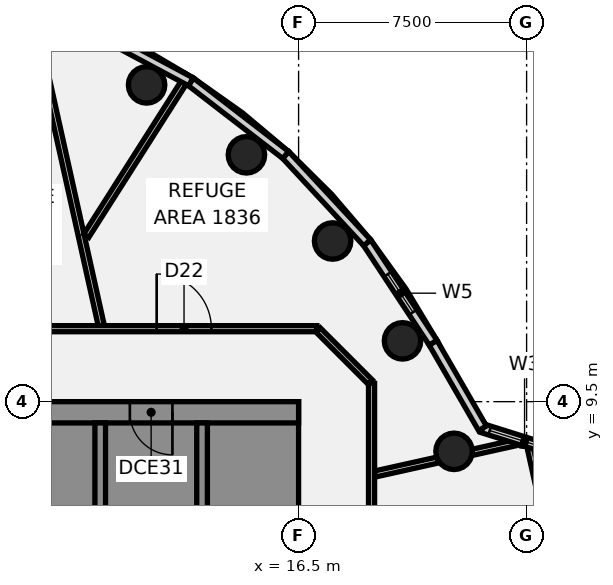
"""IFC4 building model, lengths in metres.
Left out: names, types, materials, properties, quantities, classifications, styles, units other than length and angle.
Written with IfcOpenShell. Run it as: python <this file> out.ifc"""

import sys

from ifc_helpers import new_model, si_unit, direction, frame, frame_2d, origin, origin_2d, place, context, subcontext, project, spatial, polyline, rectangle, circle, outline, extrude, element, fill, save


model = new_model("IFC4")
c1 = context("Model", 3, precision=1e-05, world=origin(), true_north=direction((0.0, 1.0)))
c2 = subcontext(c1, "Body", "Model", "MODEL_VIEW")
j1 = project(units=[si_unit("LENGTHUNIT", "METRE"), si_unit("PLANEANGLEUNIT", "RADIAN")], contexts=[c1])
p1 = place(None, origin())
s1 = spatial("IfcSite", under=j1, at=p1, CompositionType="ELEMENT")
p2 = place(p1, origin())
s2 = spatial("IfcBuilding", under=s1, at=p2, CompositionType="ELEMENT")
p3 = place(p2, frame((0.0, 0.0, 79.0)))
s3 = spatial("IfcBuildingStorey", under=s2, at=p3, CompositionType="ELEMENT", Elevation=79.0)
for number, where, z_axis, x_axis in (
    (1, (21.613, 7.866, -0.18), (0.0, 0.0, 1.0), (1.0, 0.0, 0.0)),
    (2, (19.919, 11.5, -0.18), (0.0, 0.0, 1.0), (1.0, 0.0, 0.0)),
    (3, (17.619, 14.784, -0.18), (0.0, 0.0, 1.0), (1.0, 0.0, 0.0)),
    (4, (14.784, 17.619, -0.18), (0.0, 0.0, 1.0), (1.0, 0.0, 0.0)),
    (5, (11.5, 19.919, -0.18), (0.0, 0.0, 1.0), (1.0, 0.0, 0.0)),
):
    element("IfcColumn", number, at=place(p3, frame(where, z_axis=z_axis, x_axis=x_axis)), inside=s3, PredefinedType="COLUMN", context=c2, shape_type="SweptSolid", body=[
        extrude(circle(Radius=0.6, at=origin_2d()), origin(), (0.0, 0.0, 1.0), 4.54),
    ])
p4 = place(p3, frame((7.999, 21.039, 0.0), z_axis=(0.0, 0.0, 1.0), x_axis=(0.217134305932, -0.976141738267, 0.0)))
e6 = element("IfcWall", 6, at=p4, inside=s3, PredefinedType="PARTITIONING", context=c2, shape_type="SweptSolid", body=[
    extrude(rectangle(XDim=9.257, YDim=0.2, at=frame_2d((4.628, 0.0))), origin(), (0.0, 0.0, 1.0), 3.66),
])
p5 = place(p3, frame((24.12, 7.973, 0.0), z_axis=(0.0, 0.0, 1.0), x_axis=(0.216928614258, -0.976187469862, 0.0)))
e7 = element("IfcWall", 7, at=p5, inside=s3, PredefinedType="PARTITIONING", context=c2, shape_type="SweptSolid", body=[
    extrude(rectangle(XDim=14.022, YDim=0.2, at=frame_2d((7.011, 0.0))), origin(), (0.0, 0.0, 1.0), 3.66),
])
p6 = place(p5, frame((6.723, 0.0, 0.0)))
e8 = element("IfcOpeningElement", 8, at=p6, cuts=e7, PredefinedType="OPENING", context=c2, shape_type="SweptSolid", body=[
    extrude(rectangle(XDim=1.4, YDim=2.1, at=frame_2d((0.7, 1.05))), frame((0.0, 0.11, 0.0), z_axis=(0.0, -1.0, 0.0), x_axis=(1.0, 0.0, 0.0)), (0.0, 0.0, 1.0), 0.22),
])
p7 = place(p3, frame((17.142, 11.858, 0.0), z_axis=(0.0, 0.0, 1.0), x_axis=(0.707106781187, -0.707106781187, 0.0)))
e9 = element("IfcWall", 9, at=p7, inside=s3, PredefinedType="PARTITIONING", context=c2, shape_type="SweptSolid", body=[
    extrude(rectangle(XDim=2.426, YDim=0.2, at=frame_2d((1.213, 0.0))), origin(), (0.0, 0.0, 1.0), 3.66),
])
p8 = place(p3, frame((-17.045, 11.9, 0.0), z_axis=(0.0, 0.0, 1.0), x_axis=(1.0, 0.0, 0.0)))
e10 = element("IfcWall", 10, at=p8, inside=s3, PredefinedType="PARTITIONING", context=c2, shape_type="SweptSolid", body=[
    extrude(rectangle(XDim=34.145, YDim=0.2, at=frame_2d((17.073, 0.0))), origin(), (0.0, 0.0, 1.0), 3.66),
])
p9 = place(p8, frame((18.358, 0.0, 0.0)))
e11 = element("IfcOpeningElement", 11, at=p9, cuts=e10, PredefinedType="OPENING", context=c2, shape_type="SweptSolid", body=[
    extrude(rectangle(XDim=1.8, YDim=2.1, at=frame_2d((0.9, 1.05))), frame((0.0, 0.11, 0.0), z_axis=(0.0, -1.0, 0.0), x_axis=(1.0, 0.0, 0.0)), (0.0, 0.0, 1.0), 0.22),
])
p10 = place(p8, frame((28.877, 0.0, 0.0)))
e12 = element("IfcOpeningElement", 12, at=p10, cuts=e10, PredefinedType="OPENING", context=c2, shape_type="SweptSolid", body=[
    extrude(rectangle(XDim=1.8, YDim=2.1, at=frame_2d((0.9, 1.05))), frame((0.0, 0.11, 0.0), z_axis=(0.0, -1.0, 0.0), x_axis=(1.0, 0.0, 0.0)), (0.0, 0.0, 1.0), 0.22),
])
p11 = place(p8, frame((4.895, 0.0, 0.0)))
e13 = element("IfcOpeningElement", 13, at=p11, cuts=e10, PredefinedType="OPENING", context=c2, shape_type="SweptSolid", body=[
    extrude(rectangle(XDim=1.8, YDim=2.1, at=frame_2d((0.9, 1.05))), frame((0.0, 0.11, 0.0), z_axis=(0.0, -1.0, 0.0), x_axis=(1.0, 0.0, 0.0)), (0.0, 0.0, 1.0), 0.22),
])
p12 = place(p3, frame((19.002, 7.119, 0.0), z_axis=(0.0, 0.0, 1.0), x_axis=(0.97615465389, 0.217076234739, 0.0)))
e14 = element("IfcWall", 14, at=p12, inside=s3, PredefinedType="PARTITIONING", context=c2, shape_type="SweptSolid", body=[
    extrude(rectangle(XDim=2.128, YDim=0.2, at=frame_2d((1.064, 0.0))), origin(), (0.0, 0.0, 1.0), 3.66),
])
p13 = place(p3, frame((22.214, 7.833, 0.0), z_axis=(0.0, 0.0, 1.0), x_axis=(0.976142259417, 0.217131963057, 0.0)))
e15 = element("IfcWall", 15, at=p13, inside=s3, PredefinedType="PARTITIONING", context=c2, shape_type="SweptSolid", body=[
    extrude(rectangle(XDim=1.411, YDim=0.2, at=frame_2d((0.706, 0.0))), origin(), (0.0, 0.0, 1.0), 3.66),
])
p14 = place(p3, frame((9.513, 14.952, 0.0), z_axis=(0.0, 0.0, 1.0), x_axis=(0.536804820056, 0.843706456752, 0.0)))
e16 = element("IfcWall", 16, at=p14, inside=s3, PredefinedType="PARTITIONING", context=c2, shape_type="SweptSolid", body=[
    extrude(rectangle(XDim=6.259, YDim=0.2, at=frame_2d((3.129, 0.0))), origin(), (0.0, 0.0, 1.0), 3.66),
])
p15 = place(p3, frame((18.9, -10.1, 0.0), z_axis=(0.0, 0.0, 1.0), x_axis=(0.0, 1.0, 0.0)))
e17 = element("IfcWall", 17, at=p15, inside=s3, PredefinedType="PARTITIONING", context=c2, shape_type="SweptSolid", body=[
    extrude(rectangle(XDim=20.2, YDim=0.2, at=frame_2d((10.1, 0.0))), origin(), (0.0, 0.0, 1.0), 3.66),
])
p16 = place(p15, frame((9.228, 0.0, 0.0)))
e18 = element("IfcOpeningElement", 18, at=p16, cuts=e17, PredefinedType="OPENING", context=c2, shape_type="SweptSolid", body=[
    extrude(rectangle(XDim=1.8, YDim=2.1, at=frame_2d((0.9, 1.05))), frame((0.0, 0.11, 0.0), z_axis=(0.0, -1.0, 0.0), x_axis=(1.0, 0.0, 0.0)), (0.0, 0.0, 1.0), 0.22),
])
p17 = place(p15, frame((13.794, 0.0, 0.0)))
e19 = element("IfcOpeningElement", 19, at=p17, cuts=e17, PredefinedType="OPENING", context=c2, shape_type="SweptSolid", body=[
    extrude(rectangle(XDim=1.8, YDim=2.1, at=frame_2d((0.9, 1.05))), frame((0.0, 0.11, 0.0), z_axis=(0.0, -1.0, 0.0), x_axis=(1.0, 0.0, 0.0)), (0.0, 0.0, 1.0), 0.22),
])
p18 = place(p3, frame((25.268, 7.771, 0.0), z_axis=(0.0, 0.0, 1.0), x_axis=(-0.954072095572, 0.299577096006, 0.0)))
e20 = element("IfcWall", 20, at=p18, inside=s3, PredefinedType="SOLIDWALL", context=c2, shape_type="SweptSolid", body=[
    extrude(rectangle(XDim=2.85, YDim=0.3, at=frame_2d((1.425, 0.0))), origin(), (0.0, 0.0, 1.0), 4.36),
])
p19 = place(p18, frame((0.2, 0.0, 1.4)))
e21 = element("IfcOpeningElement", 21, at=p19, cuts=e20, PredefinedType="OPENING", context=c2, shape_type="SweptSolid", body=[
    extrude(rectangle(XDim=2.4, YDim=2.1, at=frame_2d((1.2, 1.05))), frame((0.0, 0.16, 0.0), z_axis=(0.0, -1.0, 0.0), x_axis=(1.0, 0.0, 0.0)), (0.0, 0.0, 1.0), 0.32),
])
p20 = place(p3, frame((22.549, 8.625, 0.0), z_axis=(0.0, 0.0, 1.0), x_axis=(-0.500322641095, 0.86583904671, 0.0)))
e22 = element("IfcWall", 22, at=p20, inside=s3, PredefinedType="SOLIDWALL", context=c2, shape_type="SweptSolid", body=[
    extrude(rectangle(XDim=3.251, YDim=0.3, at=frame_2d((1.625, 0.0))), origin(), (0.0, 0.0, 1.0), 4.36),
])
p21 = place(p3, frame((20.923, 11.439, 0.0), z_axis=(0.0, 0.0, 1.0), x_axis=(-0.550573607302, 0.834786621205, 0.0)))
e23 = element("IfcWall", 23, at=p21, inside=s3, PredefinedType="SOLIDWALL", context=c2, shape_type="SweptSolid", body=[
    extrude(rectangle(XDim=3.938, YDim=0.3, at=frame_2d((1.969, 0.0))), origin(), (0.0, 0.0, 1.0), 4.36),
])
p22 = place(p21, frame((1.2, 0.0, 1.4)))
e24 = element("IfcOpeningElement", 24, at=p22, cuts=e23, PredefinedType="OPENING", context=c2, shape_type="SweptSolid", body=[
    extrude(rectangle(XDim=1.5, YDim=1.0, at=frame_2d((0.75, 0.5))), frame((0.0, 0.16, 0.0), z_axis=(0.0, -1.0, 0.0), x_axis=(1.0, 0.0, 0.0)), (0.0, 0.0, 1.0), 0.32),
])
p23 = place(p3, frame((18.754, 14.727, 0.0), z_axis=(0.0, 0.0, 1.0), x_axis=(-0.680429698926, 0.732813362883, 0.0)))
e25 = element("IfcWall", 25, at=p23, inside=s3, PredefinedType="SOLIDWALL", context=c2, shape_type="SweptSolid", body=[
    extrude(rectangle(XDim=3.938, YDim=0.3, at=frame_2d((1.969, 0.0))), origin(), (0.0, 0.0, 1.0), 4.36),
])
p24 = place(p3, frame((16.075, 17.613, 0.0), z_axis=(0.0, 0.0, 1.0), x_axis=(-0.79179596038, 0.610785688376, 0.0)))
e26 = element("IfcWall", 26, at=p24, inside=s3, PredefinedType="SOLIDWALL", context=c2, shape_type="SweptSolid", body=[
    extrude(rectangle(XDim=3.938, YDim=0.3, at=frame_2d((1.969, 0.0))), origin(), (0.0, 0.0, 1.0), 4.36),
])
p25 = place(p3, frame((12.956, 20.019, 0.0), z_axis=(0.0, 0.0, 1.0), x_axis=(-0.881521417359, 0.472144036007, 0.0)))
e27 = element("IfcWall", 27, at=p25, inside=s3, PredefinedType="SOLIDWALL", context=c2, shape_type="SweptSolid", body=[
    extrude(rectangle(XDim=3.94, YDim=0.3, at=frame_2d((1.97, 0.0))), origin(), (0.0, 0.0, 1.0), 4.36),
])
p26 = place(p3, origin())
e28 = element("IfcWall", 28, at=p26, inside=s3, PredefinedType="SHEAR", context=c2, shape_type="SweptSolid", body=[
    extrude(outline(polyline([(13.5, -8.8), (15.8, -8.8), (16.5, -8.8), (16.5, 8.8), (15.8, 8.8), (13.5, 8.8), (13.5, 8.125), (15.8, 8.125), (15.8, 5.625), (13.5, 5.625), (13.5, 5.375), (15.8, 5.375), (15.8, 2.875), (13.5, 2.875), (13.5, 2.625), (15.8, 2.625), (15.8, 0.125), (13.5, 0.125), (13.5, -0.125), (15.8, -0.125), (15.8, -2.625), (13.5, -2.625), (13.5, -2.875), (15.8, -2.875), (15.8, -5.375), (13.5, -5.375), (13.5, -5.625), (15.8, -5.625), (15.8, -8.125), (13.5, -8.125), (13.5, -8.8)])), origin(), (0.0, 0.0, 1.0), 4.36),
])
p27 = place(p3, frame((16.5, 9.15, 0.0), z_axis=(0.0, 0.0, 1.0), x_axis=(-1.0, 0.0, 0.0)))
e29 = element("IfcWall", 29, at=p27, inside=s3, PredefinedType="SHEAR", context=c2, shape_type="SweptSolid", body=[
    extrude(rectangle(XDim=13.0, YDim=0.7, at=frame_2d((6.5, 0.0))), origin(), (0.0, 0.0, 1.0), 4.36),
])
p28 = place(p27, frame((4.15, 0.0, 0.0)))
e30 = element("IfcOpeningElement", 30, at=p28, cuts=e29, PredefinedType="OPENING", context=c2, shape_type="SweptSolid", body=[
    extrude(rectangle(XDim=1.4, YDim=2.1, at=frame_2d((0.7, 1.05))), frame((0.0, 0.36, 0.0), z_axis=(0.0, -1.0, 0.0), x_axis=(1.0, 0.0, 0.0)), (0.0, 0.0, 1.0), 0.72),
])
p29 = place(p3, origin())
e31 = element("IfcWall", 31, at=p29, inside=s3, PredefinedType="SHEAR", context=c2, shape_type="SweptSolid", body=[
    extrude(outline(polyline([(9.8, -5.375), (7.5, -5.375), (7.5, -2.875), (9.8, -2.875), (9.8, -2.625), (7.5, -2.625), (7.5, -0.125), (9.8, -0.125), (9.8, 0.125), (7.5, 0.125), (7.5, 2.625), (9.8, 2.625), (9.8, 2.875), (7.5, 2.875), (7.5, 5.375), (9.8, 5.375), (9.8, 5.625), (7.5, 5.625), (7.5, 8.125), (9.8, 8.125), (9.8, 8.8), (7.5, 8.8), (7.15, 8.8), (7.15, -5.625), (7.5, -5.625), (9.8, -5.625), (9.8, -5.375)])), origin(), (0.0, 0.0, 1.0), 4.36),
])
p30 = place(p3, frame((13.325, -8.8, 0.0), z_axis=(0.0, 0.0, 1.0), x_axis=(0.0, 1.0, 0.0)))
e32 = element("IfcWall", 32, at=p30, inside=s3, PredefinedType="SHEAR", context=c2, shape_type="SweptSolid", body=[
    extrude(rectangle(XDim=17.6, YDim=0.35, at=frame_2d((8.8, 0.0))), origin(), (0.0, 0.0, 1.0), 4.36),
])
p31 = place(p30, frame((1.225, 0.0, 0.0)))
e33 = element("IfcOpeningElement", 33, at=p31, cuts=e32, PredefinedType="OPENING", context=c2, shape_type="SweptSolid", body=[
    extrude(rectangle(XDim=1.4, YDim=2.1, at=frame_2d((0.7, 1.05))), frame((0.0, 0.185, 0.0), z_axis=(0.0, -1.0, 0.0), x_axis=(1.0, 0.0, 0.0)), (0.0, 0.0, 1.0), 0.37),
])
p32 = place(p30, frame((4.125, 0.0, 0.0)))
e34 = element("IfcOpeningElement", 34, at=p32, cuts=e32, PredefinedType="OPENING", context=c2, shape_type="SweptSolid", body=[
    extrude(rectangle(XDim=1.1, YDim=2.1, at=frame_2d((0.55, 1.05))), frame((0.0, 0.185, 0.0), z_axis=(0.0, -1.0, 0.0), x_axis=(1.0, 0.0, 0.0)), (0.0, 0.0, 1.0), 0.37),
])
p33 = place(p30, frame((6.875, 0.0, 0.0)))
e35 = element("IfcOpeningElement", 35, at=p33, cuts=e32, PredefinedType="OPENING", context=c2, shape_type="SweptSolid", body=[
    extrude(rectangle(XDim=1.1, YDim=2.1, at=frame_2d((0.55, 1.05))), frame((0.0, 0.185, 0.0), z_axis=(0.0, -1.0, 0.0), x_axis=(1.0, 0.0, 0.0)), (0.0, 0.0, 1.0), 0.37),
])
p34 = place(p30, frame((9.625, 0.0, 0.0)))
e36 = element("IfcOpeningElement", 36, at=p34, cuts=e32, PredefinedType="OPENING", context=c2, shape_type="SweptSolid", body=[
    extrude(rectangle(XDim=1.1, YDim=2.1, at=frame_2d((0.55, 1.05))), frame((0.0, 0.185, 0.0), z_axis=(0.0, -1.0, 0.0), x_axis=(1.0, 0.0, 0.0)), (0.0, 0.0, 1.0), 0.37),
])
p35 = place(p30, frame((12.375, 0.0, 0.0)))
e37 = element("IfcOpeningElement", 37, at=p35, cuts=e32, PredefinedType="OPENING", context=c2, shape_type="SweptSolid", body=[
    extrude(rectangle(XDim=1.1, YDim=2.1, at=frame_2d((0.55, 1.05))), frame((0.0, 0.185, 0.0), z_axis=(0.0, -1.0, 0.0), x_axis=(1.0, 0.0, 0.0)), (0.0, 0.0, 1.0), 0.37),
])
p36 = place(p3, frame((9.975, -8.8, 0.0), z_axis=(0.0, 0.0, 1.0), x_axis=(0.0, 1.0, 0.0)))
e38 = element("IfcWall", 38, at=p36, inside=s3, PredefinedType="SHEAR", context=c2, shape_type="SweptSolid", body=[
    extrude(rectangle(XDim=17.6, YDim=0.35, at=frame_2d((8.8, 0.0))), origin(), (0.0, 0.0, 1.0), 4.36),
])
p37 = place(p10, origin())
e39 = element("IfcDoor", 39, at=p37, inside=s3, OperationType="DOUBLE_DOOR_SINGLE_SWING", PredefinedType="DOOR", context=c2, shape_type="SweptSolid", body=[
    extrude(rectangle(XDim=1.8, YDim=2.1, at=frame_2d((0.9, 1.05))), frame((0.0, 0.025, 0.0), z_axis=(0.0, -1.0, 0.0), x_axis=(1.0, 0.0, 0.0)), (0.0, 0.0, 1.0), 0.05),
])
fill(e12, e39)
p38 = place(p19, origin())
e40 = element("IfcWindow", 40, at=p38, inside=s3, PartitioningType="SINGLE_PANEL", PredefinedType="WINDOW", context=c2, shape_type="SweptSolid", body=[
    extrude(rectangle(XDim=2.4, YDim=2.1, at=frame_2d((1.2, 1.05))), frame((0.0, 0.03, 0.0), z_axis=(0.0, -1.0, 0.0), x_axis=(1.0, 0.0, 0.0)), (0.0, 0.0, 1.0), 0.06),
])
fill(e21, e40)
p39 = place(p22, origin())
e41 = element("IfcWindow", 41, at=p39, inside=s3, PartitioningType="SINGLE_PANEL", PredefinedType="WINDOW", context=c2, shape_type="SweptSolid", body=[
    extrude(rectangle(XDim=1.5, YDim=1.0, at=frame_2d((0.75, 0.5))), frame((0.0, 0.03, 0.0), z_axis=(0.0, -1.0, 0.0), x_axis=(1.0, 0.0, 0.0)), (0.0, 0.0, 1.0), 0.06),
])
fill(e24, e41)
p40 = place(p28, origin())
e42 = element("IfcDoor", 42, at=p40, inside=s3, OperationType="SINGLE_SWING_LEFT", PredefinedType="DOOR", context=c2, shape_type="SweptSolid", body=[
    extrude(rectangle(XDim=1.4, YDim=2.1, at=frame_2d((0.7, 1.05))), frame((0.0, 0.025, 0.0), z_axis=(0.0, -1.0, 0.0), x_axis=(1.0, 0.0, 0.0)), (0.0, 0.0, 1.0), 0.05),
])
fill(e30, e42)
save(model, sys.argv[1])
